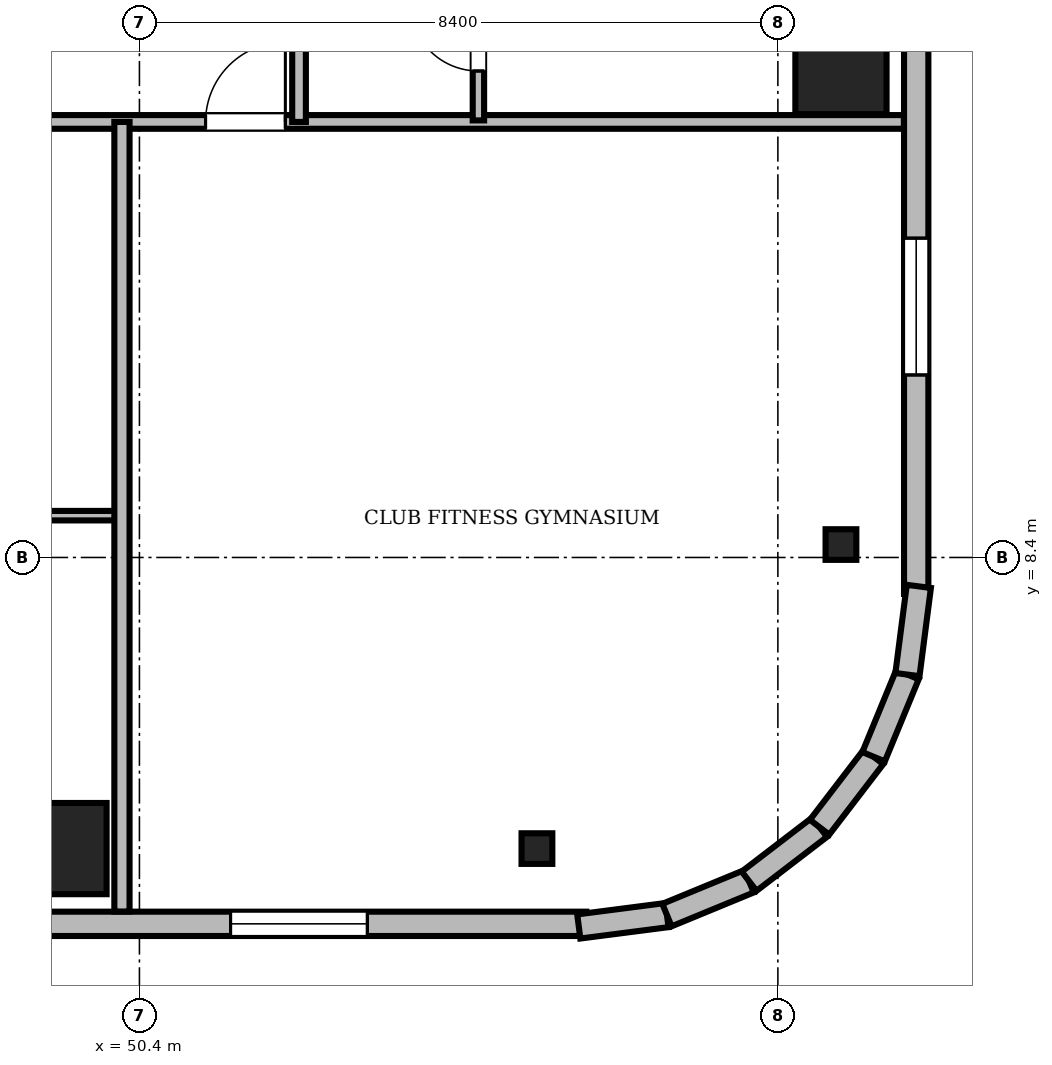
"""IFC4 building model, lengths in metres.
Left out: names, types, materials, properties, quantities, classifications, styles, units other than length and angle.
Written with IfcOpenShell. Run it as: python <this file> out.ifc"""

import sys

from ifc_helpers import new_model, si_unit, direction, frame, frame_2d, origin, origin_2d, place, context, subcontext, project, spatial, rectangle, i_section, extrude, source, transform, mapped, element, fill, save


model = new_model("IFC4")
c1 = context("Model", 3, precision=1e-05, world=origin(), true_north=direction((0.0, 1.0)))
c2 = subcontext(c1, "Body", "Model", "MODEL_VIEW")
j1 = project(units=[si_unit("LENGTHUNIT", "METRE"), si_unit("PLANEANGLEUNIT", "RADIAN")], contexts=[c1])
p1 = place(None, origin())
s1 = spatial("IfcSite", under=j1, at=p1, CompositionType="ELEMENT")
p2 = place(p1, origin())
s2 = spatial("IfcBuilding", under=s1, at=p2, CompositionType="ELEMENT")
p3 = place(p2, frame((0.0, 0.0, 266.4)))
s3 = spatial("IfcBuildingStorey", under=s2, at=p3, CompositionType="ELEMENT", Elevation=266.4)
m1 = source(origin(), c2, "Body", "SweptSolid", [
    extrude(rectangle(XDim=1.2, YDim=1.2, at=origin_2d()), origin(), (0.0, 0.0, 1.0), 3.702),
])
p4 = place(p3, frame((49.368, 4.57, 0.0), z_axis=(-0.080983660509, 0.145876105086, 0.985982661458), x_axis=(-0.874306388121, -0.485374432465, 0.0)))
e1 = element("IfcColumn", 1, at=p4, inside=s3, PredefinedType="COLUMN", context=c2, shape_type="MappedRepresentation", body=[
    mapped(m1, transform((0.0, 0.0, 0.0), scale=1.0)),
])
m2 = source(origin(), c2, "Body", "SweptSolid", [
    extrude(rectangle(XDim=1.2, YDim=1.2, at=origin_2d()), origin(), (0.0, 0.0, 1.0), 3.702),
])
p5 = place(p3, frame((59.63, 14.832, 0.0), z_axis=(-0.145810780845, 0.081049954617, 0.985986876711), x_axis=(-0.485844306078, -0.87404537082, 0.0)))
e2 = element("IfcColumn", 2, at=p5, inside=s3, PredefinedType="COLUMN", context=c2, shape_type="MappedRepresentation", body=[
    mapped(m2, transform((0.0, 0.0, 0.0), scale=1.0)),
])
m3 = source(origin(), c2, "Body", "SweptSolid", [
    extrude(i_section(OverallWidth=0.405, OverallDepth=0.403, WebThickness=0.018, FlangeThickness=0.028, FilletRadius=0.015, at=origin_2d()), origin(), (0.0, 0.0, 1.0), 3.724),
])
for number, where, z_axis, x_axis in (
    (3, (55.63, 4.57, 0.0), (-0.134, 0.145, 0.98), (-0.734, -0.679, 0.0)),
    (4, (59.63, 8.57, 0.0), (-0.145, 0.134, 0.98), (-0.68, -0.734, 0.0)),
):
    element("IfcColumn", number, at=place(p3, frame(where, z_axis=z_axis, x_axis=x_axis)), inside=s3, PredefinedType="COLUMN", context=c2, shape_type="MappedRepresentation", body=[
        mapped(m3, transform((0.0, 0.0, 0.0), scale=1.0)),
    ])
m4 = source(origin(), c2, "Body", "SweptSolid", [
    extrude(rectangle(XDim=13.98, YDim=0.32, at=frame_2d((6.99, 0.0))), origin(), (0.0, 0.0, 1.0), 3.65),
])
p6 = place(p3, frame((42.3, 3.58, 0.0), z_axis=(0.0, 0.0, 1.0), x_axis=(1.0, 0.0, 0.0)))
e5 = element("IfcWall", 5, at=p6, inside=s3, PredefinedType="SOLIDWALL", context=c2, shape_type="MappedRepresentation", body=[
    mapped(m4, transform((0.0, 0.0, 0.0), scale=1.0)),
])
m5 = source(origin(), c2, "Body", "SweptSolid", [
    extrude(rectangle(XDim=1.8, YDim=2.4, at=frame_2d((0.9, 1.2))), frame((0.0, 0.17, 0.0), z_axis=(0.0, -1.0, 0.0), x_axis=(1.0, 0.0, 0.0)), (0.0, 0.0, 1.0), 0.34),
])
p7 = place(p6, frame((9.299, 0.0, 0.72)))
e6 = element("IfcOpeningElement", 6, at=p7, cuts=e5, PredefinedType="OPENING", context=c2, shape_type="MappedRepresentation", body=[
    mapped(m5, transform((0.0, 0.0, 0.0), scale=1.0)),
])
p8 = place(p3, frame((60.62, 7.92, 0.0), z_axis=(0.0, 0.0, 1.0), x_axis=(0.0, 1.0, 0.0)))
e7 = element("IfcWall", 7, at=p8, inside=s3, PredefinedType="SOLIDWALL", context=c2, shape_type="MappedRepresentation", body=[
    mapped(m4, transform((0.0, 0.0, 0.0), scale=1.0)),
])
m6 = source(origin(), c2, "Body", "SweptSolid", [
    extrude(rectangle(XDim=1.4, YDim=2.3, at=frame_2d((0.7, 1.15))), frame((0.0, 0.17, 0.0), z_axis=(0.0, -1.0, 0.0), x_axis=(1.0, 0.0, 0.0)), (0.0, 0.0, 1.0), 0.34),
])
p9 = place(p8, frame((8.613, 0.0, 0.0)))
e8 = element("IfcOpeningElement", 8, at=p9, cuts=e7, PredefinedType="OPENING", context=c2, shape_type="MappedRepresentation", body=[
    mapped(m6, transform((0.0, 0.0, 0.0), scale=1.0)),
])
p10 = place(p8, frame((2.881, 0.0, 0.72)))
e9 = element("IfcOpeningElement", 9, at=p10, cuts=e7, PredefinedType="OPENING", context=c2, shape_type="MappedRepresentation", body=[
    mapped(m5, transform((0.0, 0.0, 0.0), scale=1.0)),
])
m7 = source(origin(), c2, "Body", "SweptSolid", [
    extrude(rectangle(XDim=1.17, YDim=0.32, at=frame_2d((0.585, 0.0))), origin(), (0.0, 0.0, 1.0), 3.65),
])
p11 = place(p3, frame((56.181, 3.545, 0.0), z_axis=(0.0, 0.0, 1.0), x_axis=(0.991782138515, 0.127938226201, 0.0)))
e10 = element("IfcWall", 10, at=p11, inside=s3, PredefinedType="SOLIDWALL", context=c2, shape_type="MappedRepresentation", body=[
    mapped(m7, transform((0.0, 0.0, 0.0), scale=1.0)),
])
m8 = source(origin(), c2, "Body", "SweptSolid", [
    extrude(rectangle(XDim=1.169, YDim=0.32, at=frame_2d((0.584, 0.0))), origin(), (0.0, 0.0, 1.0), 3.65),
])
p12 = place(p3, frame((57.341, 3.695, 0.0), z_axis=(0.0, 0.0, 1.0), x_axis=(0.924595894808, 0.380949381552, 0.0)))
e11 = element("IfcWall", 11, at=p12, inside=s3, PredefinedType="SOLIDWALL", context=c2, shape_type="MappedRepresentation", body=[
    mapped(m8, transform((0.0, 0.0, 0.0), scale=1.0)),
])
m9 = source(origin(), c2, "Body", "SweptSolid", [
    extrude(rectangle(XDim=1.168, YDim=0.32, at=frame_2d((0.584, 0.0))), origin(), (0.0, 0.0, 1.0), 3.65),
])
p13 = place(p3, frame((58.422, 4.14, 0.0), z_axis=(0.0, 0.0, 1.0), x_axis=(0.793687078033, 0.608326246486, 0.0)))
e12 = element("IfcWall", 12, at=p13, inside=s3, PredefinedType="SOLIDWALL", context=c2, shape_type="MappedRepresentation", body=[
    mapped(m9, transform((0.0, 0.0, 0.0), scale=1.0)),
])
m10 = source(origin(), c2, "Body", "SweptSolid", [
    extrude(rectangle(XDim=1.168, YDim=0.32, at=frame_2d((0.584, 0.0))), origin(), (0.0, 0.0, 1.0), 3.65),
])
p14 = place(p3, frame((59.349, 4.851, 0.0), z_axis=(0.0, 0.0, 1.0), x_axis=(0.60822536085, 0.79376439226, 0.0)))
e13 = element("IfcWall", 13, at=p14, inside=s3, PredefinedType="SOLIDWALL", context=c2, shape_type="MappedRepresentation", body=[
    mapped(m10, transform((0.0, 0.0, 0.0), scale=1.0)),
])
m11 = source(origin(), c2, "Body", "SweptSolid", [
    extrude(rectangle(XDim=1.169, YDim=0.32, at=frame_2d((0.584, 0.0))), origin(), (0.0, 0.0, 1.0), 3.65),
])
p15 = place(p3, frame((60.06, 5.779, 0.0), z_axis=(0.0, 0.0, 1.0), x_axis=(0.381022957933, 0.924565576651, 0.0)))
e14 = element("IfcWall", 14, at=p15, inside=s3, PredefinedType="SOLIDWALL", context=c2, shape_type="MappedRepresentation", body=[
    mapped(m11, transform((0.0, 0.0, 0.0), scale=1.0)),
])
m12 = source(origin(), c2, "Body", "SweptSolid", [
    extrude(rectangle(XDim=1.17, YDim=0.32, at=frame_2d((0.585, 0.0))), origin(), (0.0, 0.0, 1.0), 3.65),
])
p16 = place(p3, frame((60.505, 6.859, 0.0), z_axis=(0.0, 0.0, 1.0), x_axis=(0.12791174929, 0.991785553632, 0.0)))
e15 = element("IfcWall", 15, at=p16, inside=s3, PredefinedType="SOLIDWALL", context=c2, shape_type="MappedRepresentation", body=[
    mapped(m12, transform((0.0, 0.0, 0.0), scale=1.0)),
])
m13 = source(origin(), c2, "Body", "SweptSolid", [
    extrude(rectangle(XDim=42.916, YDim=0.18, at=frame_2d((21.458, 0.0))), origin(), (0.0, 0.0, 1.0), 2.892),
])
p17 = place(p3, frame((17.542, 14.13, 0.0), z_axis=(0.0, 0.0, 1.0), x_axis=(1.0, 0.0, 0.0)))
e16 = element("IfcWall", 16, at=p17, inside=s3, PredefinedType="PARTITIONING", context=c2, shape_type="MappedRepresentation", body=[
    mapped(m13, transform((0.0, 0.0, 0.0), scale=1.0)),
])
m14 = source(origin(), c2, "Body", "SweptSolid", [
    extrude(rectangle(XDim=1.05, YDim=2.2, at=frame_2d((0.525, 1.1))), frame((0.0, 0.1, 0.0), z_axis=(0.0, -1.0, 0.0), x_axis=(1.0, 0.0, 0.0)), (0.0, 0.0, 1.0), 0.2),
])
p18 = place(p17, frame((4.998, 0.0, 0.0)))
e17 = element("IfcOpeningElement", 17, at=p18, cuts=e16, PredefinedType="OPENING", context=c2, shape_type="MappedRepresentation", body=[
    mapped(m14, transform((0.0, 0.0, 0.0), scale=1.0)),
])
p19 = place(p17, frame((7.553, 0.0, 0.0)))
e18 = element("IfcOpeningElement", 18, at=p19, cuts=e16, PredefinedType="OPENING", context=c2, shape_type="MappedRepresentation", body=[
    mapped(m14, transform((0.0, 0.0, 0.0), scale=1.0)),
])
p20 = place(p17, frame((11.724, 0.0, 0.0)))
e19 = element("IfcOpeningElement", 19, at=p20, cuts=e16, PredefinedType="OPENING", context=c2, shape_type="MappedRepresentation", body=[
    mapped(m14, transform((0.0, 0.0, 0.0), scale=1.0)),
])
p21 = place(p17, frame((15.896, 0.0, 0.0)))
e20 = element("IfcOpeningElement", 20, at=p21, cuts=e16, PredefinedType="OPENING", context=c2, shape_type="MappedRepresentation", body=[
    mapped(m14, transform((0.0, 0.0, 0.0), scale=1.0)),
])
p22 = place(p17, frame((19.734, 0.0, 0.0)))
e21 = element("IfcOpeningElement", 21, at=p22, cuts=e16, PredefinedType="OPENING", context=c2, shape_type="MappedRepresentation", body=[
    mapped(m14, transform((0.0, 0.0, 0.0), scale=1.0)),
])
p23 = place(p17, frame((24.038, 0.0, 0.0)))
e22 = element("IfcOpeningElement", 22, at=p23, cuts=e16, PredefinedType="OPENING", context=c2, shape_type="MappedRepresentation", body=[
    mapped(m14, transform((0.0, 0.0, 0.0), scale=1.0)),
])
p24 = place(p17, frame((29.168, 0.0, 0.0)))
e23 = element("IfcOpeningElement", 23, at=p24, cuts=e16, PredefinedType="OPENING", context=c2, shape_type="MappedRepresentation", body=[
    mapped(m14, transform((0.0, 0.0, 0.0), scale=1.0)),
])
p25 = place(p17, frame((33.728, 0.0, 0.0)))
e24 = element("IfcOpeningElement", 24, at=p25, cuts=e16, PredefinedType="OPENING", context=c2, shape_type="MappedRepresentation", body=[
    mapped(m14, transform((0.0, 0.0, 0.0), scale=1.0)),
])
m15 = source(origin(), c2, "Body", "SweptSolid", [
    extrude(rectangle(XDim=26.97, YDim=0.18, at=frame_2d((13.485, 0.0))), origin(), (0.0, 0.0, 1.0), 3.092),
])
p26 = place(p3, frame((52.5, 14.13, 0.0), z_axis=(0.0, 0.0, 1.0), x_axis=(0.0, 1.0, 0.0)))
e25 = element("IfcWall", 25, at=p26, inside=s3, PredefinedType="PARTITIONING", context=c2, shape_type="MappedRepresentation", body=[
    mapped(m15, transform((0.0, 0.0, 0.0), scale=1.0)),
])
p27 = place(p26, frame((4.009, 0.0, 0.0)))
e26 = element("IfcOpeningElement", 26, at=p27, cuts=e25, PredefinedType="OPENING", context=c2, shape_type="MappedRepresentation", body=[
    mapped(m14, transform((0.0, 0.0, 0.0), scale=1.0)),
])
p28 = place(p26, frame((10.696, 0.0, 0.0)))
e27 = element("IfcOpeningElement", 27, at=p28, cuts=e25, PredefinedType="OPENING", context=c2, shape_type="MappedRepresentation", body=[
    mapped(m14, transform((0.0, 0.0, 0.0), scale=1.0)),
])
p29 = place(p26, frame((17.384, 0.0, 0.0)))
e28 = element("IfcOpeningElement", 28, at=p29, cuts=e25, PredefinedType="OPENING", context=c2, shape_type="MappedRepresentation", body=[
    mapped(m14, transform((0.0, 0.0, 0.0), scale=1.0)),
])
p30 = place(p26, frame((24.071, 0.0, 0.0)))
e29 = element("IfcOpeningElement", 29, at=p30, cuts=e25, PredefinedType="OPENING", context=c2, shape_type="MappedRepresentation", body=[
    mapped(m14, transform((0.0, 0.0, 0.0), scale=1.0)),
])
m16 = source(origin(), c2, "Body", "SweptSolid", [
    extrude(rectangle(XDim=5.88, YDim=0.125, at=frame_2d((2.94, 0.0))), origin(), (0.0, 0.0, 1.0), 3.092),
])
p31 = place(p3, frame((44.29, 8.95, 0.0), z_axis=(0.0, 0.0, 1.0), x_axis=(1.0, 0.0, 0.0)))
e30 = element("IfcWall", 30, at=p31, inside=s3, PredefinedType="PARTITIONING", context=c2, shape_type="MappedRepresentation", body=[
    mapped(m16, transform((0.0, 0.0, 0.0), scale=1.0)),
])
m17 = source(origin(), c2, "Body", "SweptSolid", [
    extrude(rectangle(XDim=0.95, YDim=2.15, at=frame_2d((0.475, 1.075))), frame((0.0, 0.073, 0.0), z_axis=(0.0, -1.0, 0.0), x_axis=(1.0, 0.0, 0.0)), (0.0, 0.0, 1.0), 0.145),
])
p32 = place(p31, frame((2.46, 0.0, 0.0)))
e31 = element("IfcOpeningElement", 31, at=p32, cuts=e30, PredefinedType="OPENING", context=c2, shape_type="MappedRepresentation", body=[
    mapped(m17, transform((0.0, 0.0, 0.0), scale=1.0)),
])
m18 = source(origin(), c2, "Body", "SweptSolid", [
    extrude(rectangle(XDim=2.29, YDim=0.15, at=frame_2d((1.145, 0.0))), origin(), (0.0, 0.0, 1.0), 3.092),
])
p33 = place(p3, frame((54.86, 14.15, 0.0), z_axis=(0.0, 0.0, 1.0), x_axis=(0.0, 1.0, 0.0)))
e32 = element("IfcWall", 32, at=p33, inside=s3, PredefinedType="PARTITIONING", context=c2, shape_type="MappedRepresentation", body=[
    mapped(m18, transform((0.0, 0.0, 0.0), scale=1.0)),
])
m19 = source(origin(), c2, "Body", "SweptSolid", [
    extrude(rectangle(XDim=0.9, YDim=2.1, at=frame_2d((0.45, 1.05))), frame((0.0, 0.085, 0.0), z_axis=(0.0, -1.0, 0.0), x_axis=(1.0, 0.0, 0.0)), (0.0, 0.0, 1.0), 0.17),
])
p34 = place(p33, frame((0.65, 0.0, 0.0)))
e33 = element("IfcOpeningElement", 33, at=p34, cuts=e32, PredefinedType="OPENING", context=c2, shape_type="MappedRepresentation", body=[
    mapped(m19, transform((0.0, 0.0, 0.0), scale=1.0)),
])
m20 = source(origin(), c2, "Body", "SweptSolid", [
    extrude(rectangle(XDim=10.388, YDim=0.2, at=frame_2d((5.194, 0.0))), origin(), (0.0, 0.0, 1.0), 2.892),
])
p35 = place(p3, frame((50.17, 3.742, 0.0), z_axis=(0.0, 0.0, 1.0), x_axis=(0.0, 1.0, 0.0)))
e34 = element("IfcWall", 34, at=p35, inside=s3, PredefinedType="PARTITIONING", context=c2, shape_type="MappedRepresentation", body=[
    mapped(m20, transform((0.0, 0.0, 0.0), scale=1.0)),
])
m21 = source(origin(), c2, "Body", "SweptSolid", [
    extrude(rectangle(XDim=1.8, YDim=2.4, at=frame_2d((0.9, 1.2))), frame((0.0, 0.03, 0.0), z_axis=(0.0, -1.0, 0.0), x_axis=(1.0, 0.0, 0.0)), (0.0, 0.0, 1.0), 0.06),
])
p36 = place(p7, origin())
e35 = element("IfcWindow", 35, at=p36, inside=s3, PartitioningType="SINGLE_PANEL", PredefinedType="WINDOW", context=c2, shape_type="MappedRepresentation", body=[
    mapped(m21, transform((0.0, 0.0, 0.0), scale=1.0)),
])
fill(e6, e35)
p37 = place(p10, origin())
e36 = element("IfcWindow", 36, at=p37, inside=s3, PartitioningType="SINGLE_PANEL", PredefinedType="WINDOW", context=c2, shape_type="MappedRepresentation", body=[
    mapped(m21, transform((0.0, 0.0, 0.0), scale=1.0)),
])
fill(e9, e36)
m22 = source(origin(), c2, "Body", "SweptSolid", [
    extrude(rectangle(XDim=1.05, YDim=2.2, at=frame_2d((0.525, 1.1))), frame((0.0, 0.025, 0.0), z_axis=(0.0, -1.0, 0.0), x_axis=(1.0, 0.0, 0.0)), (0.0, 0.0, 1.0), 0.05),
])
p38 = place(p25, origin())
e37 = element("IfcDoor", 37, at=p38, inside=s3, OperationType="SINGLE_SWING_RIGHT", PredefinedType="DOOR", context=c2, shape_type="MappedRepresentation", body=[
    mapped(m22, transform((0.0, 0.0, 0.0), scale=1.0)),
])
fill(e24, e37)
m23 = source(origin(), c2, "Body", "SweptSolid", [
    extrude(rectangle(XDim=0.9, YDim=2.1, at=frame_2d((0.45, 1.05))), frame((0.0, 0.025, 0.0), z_axis=(0.0, -1.0, 0.0), x_axis=(1.0, 0.0, 0.0)), (0.0, 0.0, 1.0), 0.05),
])
p39 = place(p34, origin())
e38 = element("IfcDoor", 38, at=p39, inside=s3, OperationType="SINGLE_SWING_RIGHT", PredefinedType="DOOR", context=c2, shape_type="MappedRepresentation", body=[
    mapped(m23, transform((0.0, 0.0, 0.0), scale=1.0)),
])
fill(e33, e38)
save(model, sys.argv[1])
